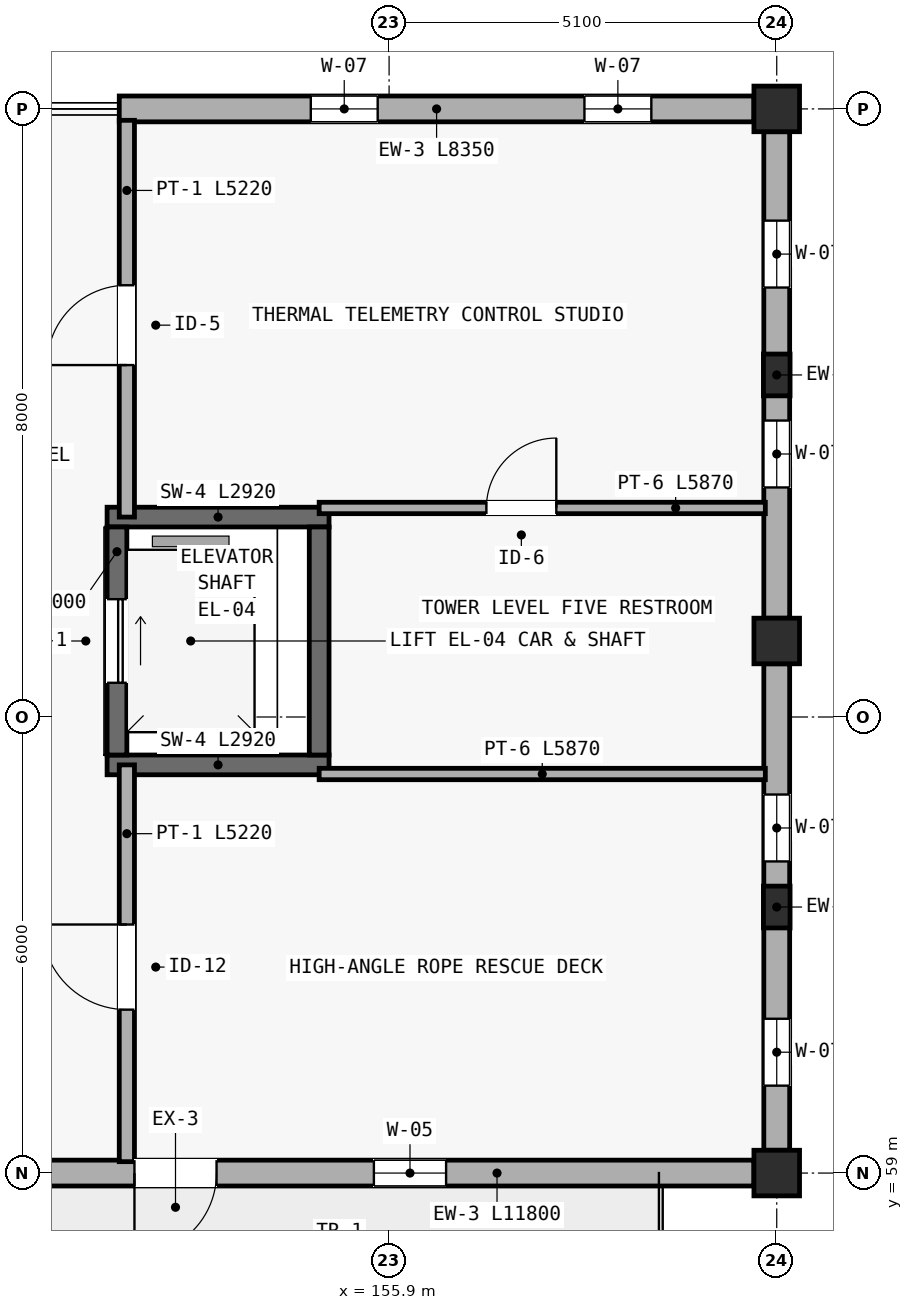
"""IFC4 building model, lengths in metres.
Left out: names, types, materials, properties, quantities, classifications, styles, units other than length and angle.
Written with IfcOpenShell. Run it as: python <this file> out.ifc"""

import sys

from ifc_helpers import new_model, si_unit, direction, frame, frame_2d, origin, origin_2d, place, context, subcontext, project, spatial, rectangle, extrude, element, fill, save


model = new_model("IFC4")
c1 = context("Model", 3, precision=1e-05, world=origin(), true_north=direction((0.0, 1.0)))
c2 = subcontext(c1, "Body", "Model", "MODEL_VIEW")
j1 = project(units=[si_unit("LENGTHUNIT", "METRE"), si_unit("PLANEANGLEUNIT", "RADIAN")], contexts=[c1])
p1 = place(None, origin())
s1 = spatial("IfcSite", under=j1, at=p1, CompositionType="ELEMENT")
p2 = place(p1, origin())
s2 = spatial("IfcBuilding", under=s1, at=p2, CompositionType="ELEMENT")
p3 = place(p2, frame((0.0, 0.0, 17.4)))
s3 = spatial("IfcBuildingStorey", under=s2, at=p3, CompositionType="ELEMENT", Elevation=17.4)
for number, where, z_axis, x_axis in (
    (1, (161.0, 59.0, 0.0), (0.0, 0.0, 1.0), (1.0, 0.0, 0.0)),
    (2, (161.0, 66.0, 0.0), (0.0, 0.0, 1.0), (1.0, 0.0, 0.0)),
    (3, (161.0, 73.0, 0.0), (0.0, 0.0, 1.0), (1.0, 0.0, 0.0)),
):
    element("IfcColumn", number, at=place(p3, frame(where, z_axis=z_axis, x_axis=x_axis)), inside=s3, PredefinedType="COLUMN", context=c2, shape_type="SweptSolid", body=[
        extrude(rectangle(XDim=0.6, YDim=0.6, at=origin_2d()), origin(), (0.0, 0.0, 1.0), 4.65),
    ])
for number, where, z_axis, x_axis in (
    (4, (161.0, 62.5, 0.0), (0.0, 0.0, 1.0), (1.0, 0.0, 0.0)),
    (5, (161.0, 69.5, 0.0), (0.0, 0.0, 1.0), (1.0, 0.0, 0.0)),
):
    element("IfcColumn", number, at=place(p3, frame(where, z_axis=z_axis, x_axis=x_axis)), inside=s3, PredefinedType="PILASTER", context=c2, shape_type="SweptSolid", body=[
        extrude(rectangle(XDim=0.35, YDim=0.55, at=origin_2d()), origin(), (0.0, 0.0, 1.0), 4.65),
    ])
p4 = place(p3, frame((148.9, 59.0, 0.0), z_axis=(0.0, 0.0, 1.0), x_axis=(1.0, 0.0, 0.0)))
e6 = element("IfcWall", 6, at=p4, inside=s3, PredefinedType="STANDARD", context=c2, shape_type="SweptSolid", body=[
    extrude(rectangle(XDim=11.8, YDim=0.34, at=frame_2d((5.9, 0.0))), origin(), (0.0, 0.0, 1.0), 3.95),
])
p5 = place(p4, frame((3.65, 0.0, 0.0)))
e7 = element("IfcOpeningElement", 7, at=p5, cuts=e6, PredefinedType="OPENING", context=c2, shape_type="SweptSolid", body=[
    extrude(rectangle(XDim=1.08, YDim=2.1, at=frame_2d((0.54, 1.05))), frame((0.0, 0.18, 0.0), z_axis=(0.0, -1.0, 0.0), x_axis=(1.0, 0.0, 0.0)), (0.0, 0.0, 1.0), 0.36),
])
p6 = place(p4, frame((1.2, 0.0, 0.75)))
e8 = element("IfcOpeningElement", 8, at=p6, cuts=e6, PredefinedType="OPENING", context=c2, shape_type="SweptSolid", body=[
    extrude(rectangle(XDim=0.95, YDim=1.35, at=frame_2d((0.475, 0.675))), frame((0.0, 0.18, 0.0), z_axis=(0.0, -1.0, 0.0), x_axis=(1.0, 0.0, 0.0)), (0.0, 0.0, 1.0), 0.36),
])
p7 = place(p4, frame((6.8, 0.0, 0.75)))
e9 = element("IfcOpeningElement", 9, at=p7, cuts=e6, PredefinedType="OPENING", context=c2, shape_type="SweptSolid", body=[
    extrude(rectangle(XDim=0.95, YDim=1.35, at=frame_2d((0.475, 0.675))), frame((0.0, 0.18, 0.0), z_axis=(0.0, -1.0, 0.0), x_axis=(1.0, 0.0, 0.0)), (0.0, 0.0, 1.0), 0.36),
])
p8 = place(p3, frame((160.7, 73.0, 0.0), z_axis=(0.0, 0.0, 1.0), x_axis=(-1.0, 0.0, 0.0)))
e10 = element("IfcWall", 10, at=p8, inside=s3, PredefinedType="STANDARD", context=c2, shape_type="SweptSolid", body=[
    extrude(rectangle(XDim=8.35, YDim=0.34, at=frame_2d((4.175, 0.0))), origin(), (0.0, 0.0, 1.0), 3.95),
])
p9 = place(p8, frame((1.35, 0.0, 0.75)))
e11 = element("IfcOpeningElement", 11, at=p9, cuts=e10, PredefinedType="OPENING", context=c2, shape_type="SweptSolid", body=[
    extrude(rectangle(XDim=0.88, YDim=1.5, at=frame_2d((0.44, 0.75))), frame((0.0, 0.18, 0.0), z_axis=(0.0, -1.0, 0.0), x_axis=(1.0, 0.0, 0.0)), (0.0, 0.0, 1.0), 0.36),
])
p10 = place(p8, frame((4.95, 0.0, 0.75)))
e12 = element("IfcOpeningElement", 12, at=p10, cuts=e10, PredefinedType="OPENING", context=c2, shape_type="SweptSolid", body=[
    extrude(rectangle(XDim=0.88, YDim=1.5, at=frame_2d((0.44, 0.75))), frame((0.0, 0.18, 0.0), z_axis=(0.0, -1.0, 0.0), x_axis=(1.0, 0.0, 0.0)), (0.0, 0.0, 1.0), 0.36),
])
p11 = place(p3, frame((161.0, 59.3, 0.0), z_axis=(0.0, 0.0, 1.0), x_axis=(0.0, 1.0, 0.0)))
e13 = element("IfcWall", 13, at=p11, inside=s3, PredefinedType="STANDARD", context=c2, shape_type="SweptSolid", body=[
    extrude(rectangle(XDim=6.4, YDim=0.34, at=frame_2d((3.2, 0.0))), origin(), (0.0, 0.0, 1.0), 3.95),
])
p12 = place(p11, frame((0.85, 0.0, 0.75)))
e14 = element("IfcOpeningElement", 14, at=p12, cuts=e13, PredefinedType="OPENING", context=c2, shape_type="SweptSolid", body=[
    extrude(rectangle(XDim=0.88, YDim=1.5, at=frame_2d((0.44, 0.75))), frame((0.0, 0.18, 0.0), z_axis=(0.0, -1.0, 0.0), x_axis=(1.0, 0.0, 0.0)), (0.0, 0.0, 1.0), 0.36),
])
p13 = place(p11, frame((3.8, 0.0, 0.75)))
e15 = element("IfcOpeningElement", 15, at=p13, cuts=e13, PredefinedType="OPENING", context=c2, shape_type="SweptSolid", body=[
    extrude(rectangle(XDim=0.88, YDim=1.5, at=frame_2d((0.44, 0.75))), frame((0.0, 0.18, 0.0), z_axis=(0.0, -1.0, 0.0), x_axis=(1.0, 0.0, 0.0)), (0.0, 0.0, 1.0), 0.36),
])
p14 = place(p3, frame((161.0, 66.3, 0.0), z_axis=(0.0, 0.0, 1.0), x_axis=(0.0, 1.0, 0.0)))
e16 = element("IfcWall", 16, at=p14, inside=s3, PredefinedType="STANDARD", context=c2, shape_type="SweptSolid", body=[
    extrude(rectangle(XDim=6.4, YDim=0.34, at=frame_2d((3.2, 0.0))), origin(), (0.0, 0.0, 1.0), 3.95),
])
p15 = place(p14, frame((1.72, 0.0, 0.75)))
e17 = element("IfcOpeningElement", 17, at=p15, cuts=e16, PredefinedType="OPENING", context=c2, shape_type="SweptSolid", body=[
    extrude(rectangle(XDim=0.88, YDim=1.5, at=frame_2d((0.44, 0.75))), frame((0.0, 0.18, 0.0), z_axis=(0.0, -1.0, 0.0), x_axis=(1.0, 0.0, 0.0)), (0.0, 0.0, 1.0), 0.36),
])
p16 = place(p14, frame((4.35, 0.0, 0.75)))
e18 = element("IfcOpeningElement", 18, at=p16, cuts=e16, PredefinedType="OPENING", context=c2, shape_type="SweptSolid", body=[
    extrude(rectangle(XDim=0.88, YDim=1.5, at=frame_2d((0.44, 0.75))), frame((0.0, 0.18, 0.0), z_axis=(0.0, -1.0, 0.0), x_axis=(1.0, 0.0, 0.0)), (0.0, 0.0, 1.0), 0.36),
])
for number, where, z_axis, x_axis in (
    (19, (152.19, 64.37, 0.0), (0.0, 0.0, 1.0), (1.0, 0.0, 0.0)),
    (20, (155.11, 67.63, 0.0), (0.0, 0.0, 1.0), (-1.0, 0.0, 0.0)),
):
    element("IfcWall", number, at=place(p3, frame(where, z_axis=z_axis, x_axis=x_axis)), inside=s3, PredefinedType="SHEAR", context=c2, shape_type="SweptSolid", body=[
        extrude(rectangle(XDim=2.92, YDim=0.26, at=frame_2d((1.46, 0.0))), origin(), (0.0, 0.0, 1.0), 4.4),
    ])
p17 = place(p3, frame((152.32, 67.5, 0.0), z_axis=(0.0, 0.0, 1.0), x_axis=(0.0, -1.0, 0.0)))
e21 = element("IfcWall", 21, at=p17, inside=s3, PredefinedType="SHEAR", context=c2, shape_type="SweptSolid", body=[
    extrude(rectangle(XDim=3.0, YDim=0.26, at=frame_2d((1.5, 0.0))), origin(), (0.0, 0.0, 1.0), 4.4),
])
p18 = place(p17, frame((0.95, 0.0, 0.0)))
e22 = element("IfcOpeningElement", 22, at=p18, cuts=e21, PredefinedType="OPENING", context=c2, shape_type="SweptSolid", body=[
    extrude(rectangle(XDim=1.1, YDim=2.15, at=frame_2d((0.55, 1.075))), frame((0.0, 0.14, 0.0), z_axis=(0.0, -1.0, 0.0), x_axis=(1.0, 0.0, 0.0)), (0.0, 0.0, 1.0), 0.28),
])
p19 = place(p3, frame((154.98, 64.5, 0.0), z_axis=(0.0, 0.0, 1.0), x_axis=(0.0, 1.0, 0.0)))
e23 = element("IfcWall", 23, at=p19, inside=s3, PredefinedType="SHEAR", context=c2, shape_type="SweptSolid", body=[
    extrude(rectangle(XDim=3.0, YDim=0.26, at=frame_2d((1.5, 0.0))), origin(), (0.0, 0.0, 1.0), 4.4),
])
p20 = place(p3, frame((152.45, 59.15, 0.0), z_axis=(0.0, 0.0, 1.0), x_axis=(0.0, 1.0, 0.0)))
e24 = element("IfcWall", 24, at=p20, inside=s3, PredefinedType="PARTITIONING", context=c2, shape_type="SweptSolid", body=[
    extrude(rectangle(XDim=5.22, YDim=0.2, at=frame_2d((2.61, 0.0))), origin(), (0.0, 0.0, 1.0), 3.9),
])
p21 = place(p20, frame((2.0, 0.0, 0.0)))
e25 = element("IfcOpeningElement", 25, at=p21, cuts=e24, PredefinedType="OPENING", context=c2, shape_type="SweptSolid", body=[
    extrude(rectangle(XDim=1.12, YDim=2.15, at=frame_2d((0.56, 1.075))), frame((0.0, 0.11, 0.0), z_axis=(0.0, -1.0, 0.0), x_axis=(1.0, 0.0, 0.0)), (0.0, 0.0, 1.0), 0.22),
])
p22 = place(p3, frame((152.45, 67.63, 0.0), z_axis=(0.0, 0.0, 1.0), x_axis=(0.0, 1.0, 0.0)))
e26 = element("IfcWall", 26, at=p22, inside=s3, PredefinedType="PARTITIONING", context=c2, shape_type="SweptSolid", body=[
    extrude(rectangle(XDim=5.22, YDim=0.2, at=frame_2d((2.61, 0.0))), origin(), (0.0, 0.0, 1.0), 3.9),
])
p23 = place(p22, frame((2.0, 0.0, 0.0)))
e27 = element("IfcOpeningElement", 27, at=p23, cuts=e26, PredefinedType="OPENING", context=c2, shape_type="SweptSolid", body=[
    extrude(rectangle(XDim=1.05, YDim=2.14, at=frame_2d((0.525, 1.07))), frame((0.0, 0.11, 0.0), z_axis=(0.0, -1.0, 0.0), x_axis=(1.0, 0.0, 0.0)), (0.0, 0.0, 1.0), 0.22),
])
p24 = place(p3, frame((154.98, 64.25, 0.0), z_axis=(0.0, 0.0, 1.0), x_axis=(1.0, 0.0, 0.0)))
e28 = element("IfcWall", 28, at=p24, inside=s3, PredefinedType="PARTITIONING", context=c2, shape_type="SweptSolid", body=[
    extrude(rectangle(XDim=5.87, YDim=0.15, at=frame_2d((2.935, 0.0))), origin(), (0.0, 0.0, 1.0), 3.9),
])
p25 = place(p3, frame((154.98, 67.75, 0.0), z_axis=(0.0, 0.0, 1.0), x_axis=(1.0, 0.0, 0.0)))
e29 = element("IfcWall", 29, at=p25, inside=s3, PredefinedType="PARTITIONING", context=c2, shape_type="SweptSolid", body=[
    extrude(rectangle(XDim=5.87, YDim=0.15, at=frame_2d((2.935, 0.0))), origin(), (0.0, 0.0, 1.0), 3.9),
])
p26 = place(p25, frame((2.2, 0.0, 0.0)))
e30 = element("IfcOpeningElement", 30, at=p26, cuts=e29, PredefinedType="OPENING", context=c2, shape_type="SweptSolid", body=[
    extrude(rectangle(XDim=0.92, YDim=2.1, at=frame_2d((0.46, 1.05))), frame((0.0, 0.085, 0.0), z_axis=(0.0, -1.0, 0.0), x_axis=(1.0, 0.0, 0.0)), (0.0, 0.0, 1.0), 0.17),
])
p27 = place(p5, frame((1.08, 0.0, 0.0), z_axis=(0.0, 0.0, 1.0), x_axis=(-1.0, 0.0, 0.0)))
e31 = element("IfcDoor", 31, at=p27, inside=s3, OperationType="SINGLE_SWING_LEFT", PredefinedType="DOOR", context=c2, shape_type="SweptSolid", body=[
    extrude(rectangle(XDim=1.08, YDim=2.1, at=frame_2d((0.54, 1.05))), frame((0.0, 0.025, 0.0), z_axis=(0.0, -1.0, 0.0), x_axis=(1.0, 0.0, 0.0)), (0.0, 0.0, 1.0), 0.05),
])
fill(e7, e31)
p28 = place(p7, origin())
e32 = element("IfcWindow", 32, at=p28, inside=s3, PartitioningType="SINGLE_PANEL", PredefinedType="WINDOW", context=c2, shape_type="SweptSolid", body=[
    extrude(rectangle(XDim=0.95, YDim=1.35, at=frame_2d((0.475, 0.675))), frame((0.0, 0.03, 0.0), z_axis=(0.0, -1.0, 0.0), x_axis=(1.0, 0.0, 0.0)), (0.0, 0.0, 1.0), 0.06),
])
fill(e9, e32)
p29 = place(p9, origin())
e33 = element("IfcWindow", 33, at=p29, inside=s3, PartitioningType="SINGLE_PANEL", PredefinedType="WINDOW", context=c2, shape_type="SweptSolid", body=[
    extrude(rectangle(XDim=0.88, YDim=1.5, at=frame_2d((0.44, 0.75))), frame((0.0, 0.03, 0.0), z_axis=(0.0, -1.0, 0.0), x_axis=(1.0, 0.0, 0.0)), (0.0, 0.0, 1.0), 0.06),
])
fill(e11, e33)
p30 = place(p10, origin())
e34 = element("IfcWindow", 34, at=p30, inside=s3, PartitioningType="SINGLE_PANEL", PredefinedType="WINDOW", context=c2, shape_type="SweptSolid", body=[
    extrude(rectangle(XDim=0.88, YDim=1.5, at=frame_2d((0.44, 0.75))), frame((0.0, 0.03, 0.0), z_axis=(0.0, -1.0, 0.0), x_axis=(1.0, 0.0, 0.0)), (0.0, 0.0, 1.0), 0.06),
])
fill(e12, e34)
p31 = place(p12, origin())
e35 = element("IfcWindow", 35, at=p31, inside=s3, PartitioningType="SINGLE_PANEL", PredefinedType="WINDOW", context=c2, shape_type="SweptSolid", body=[
    extrude(rectangle(XDim=0.88, YDim=1.5, at=frame_2d((0.44, 0.75))), frame((0.0, 0.03, 0.0), z_axis=(0.0, -1.0, 0.0), x_axis=(1.0, 0.0, 0.0)), (0.0, 0.0, 1.0), 0.06),
])
fill(e14, e35)
p32 = place(p13, origin())
e36 = element("IfcWindow", 36, at=p32, inside=s3, PartitioningType="SINGLE_PANEL", PredefinedType="WINDOW", context=c2, shape_type="SweptSolid", body=[
    extrude(rectangle(XDim=0.88, YDim=1.5, at=frame_2d((0.44, 0.75))), frame((0.0, 0.03, 0.0), z_axis=(0.0, -1.0, 0.0), x_axis=(1.0, 0.0, 0.0)), (0.0, 0.0, 1.0), 0.06),
])
fill(e15, e36)
p33 = place(p15, origin())
e37 = element("IfcWindow", 37, at=p33, inside=s3, PartitioningType="SINGLE_PANEL", PredefinedType="WINDOW", context=c2, shape_type="SweptSolid", body=[
    extrude(rectangle(XDim=0.88, YDim=1.5, at=frame_2d((0.44, 0.75))), frame((0.0, 0.03, 0.0), z_axis=(0.0, -1.0, 0.0), x_axis=(1.0, 0.0, 0.0)), (0.0, 0.0, 1.0), 0.06),
])
fill(e17, e37)
p34 = place(p16, origin())
e38 = element("IfcWindow", 38, at=p34, inside=s3, PartitioningType="SINGLE_PANEL", PredefinedType="WINDOW", context=c2, shape_type="SweptSolid", body=[
    extrude(rectangle(XDim=0.88, YDim=1.5, at=frame_2d((0.44, 0.75))), frame((0.0, 0.03, 0.0), z_axis=(0.0, -1.0, 0.0), x_axis=(1.0, 0.0, 0.0)), (0.0, 0.0, 1.0), 0.06),
])
fill(e18, e38)
p35 = place(p18, origin())
e39 = element("IfcDoor", 39, at=p35, inside=s3, OperationType="SLIDING_TO_LEFT", PredefinedType="DOOR", context=c2, shape_type="SweptSolid", body=[
    extrude(rectangle(XDim=1.1, YDim=2.15, at=frame_2d((0.55, 1.075))), frame((0.0, 0.025, 0.0), z_axis=(0.0, -1.0, 0.0), x_axis=(1.0, 0.0, 0.0)), (0.0, 0.0, 1.0), 0.05),
])
fill(e22, e39)
p36 = place(p21, origin())
e40 = element("IfcDoor", 40, at=p36, inside=s3, OperationType="SINGLE_SWING_RIGHT", PredefinedType="DOOR", context=c2, shape_type="SweptSolid", body=[
    extrude(rectangle(XDim=1.12, YDim=2.15, at=frame_2d((0.56, 1.075))), frame((0.0, 0.025, 0.0), z_axis=(0.0, -1.0, 0.0), x_axis=(1.0, 0.0, 0.0)), (0.0, 0.0, 1.0), 0.05),
])
fill(e25, e40)
p37 = place(p23, origin())
e41 = element("IfcDoor", 41, at=p37, inside=s3, OperationType="SINGLE_SWING_LEFT", PredefinedType="DOOR", context=c2, shape_type="SweptSolid", body=[
    extrude(rectangle(XDim=1.05, YDim=2.14, at=frame_2d((0.525, 1.07))), frame((0.0, 0.025, 0.0), z_axis=(0.0, -1.0, 0.0), x_axis=(1.0, 0.0, 0.0)), (0.0, 0.0, 1.0), 0.05),
])
fill(e27, e41)
p38 = place(p26, origin())
e42 = element("IfcDoor", 42, at=p38, inside=s3, OperationType="SINGLE_SWING_RIGHT", PredefinedType="DOOR", context=c2, shape_type="SweptSolid", body=[
    extrude(rectangle(XDim=0.92, YDim=2.1, at=frame_2d((0.46, 1.05))), frame((0.0, 0.025, 0.0), z_axis=(0.0, -1.0, 0.0), x_axis=(1.0, 0.0, 0.0)), (0.0, 0.0, 1.0), 0.05),
])
fill(e30, e42)
save(model, sys.argv[1])
